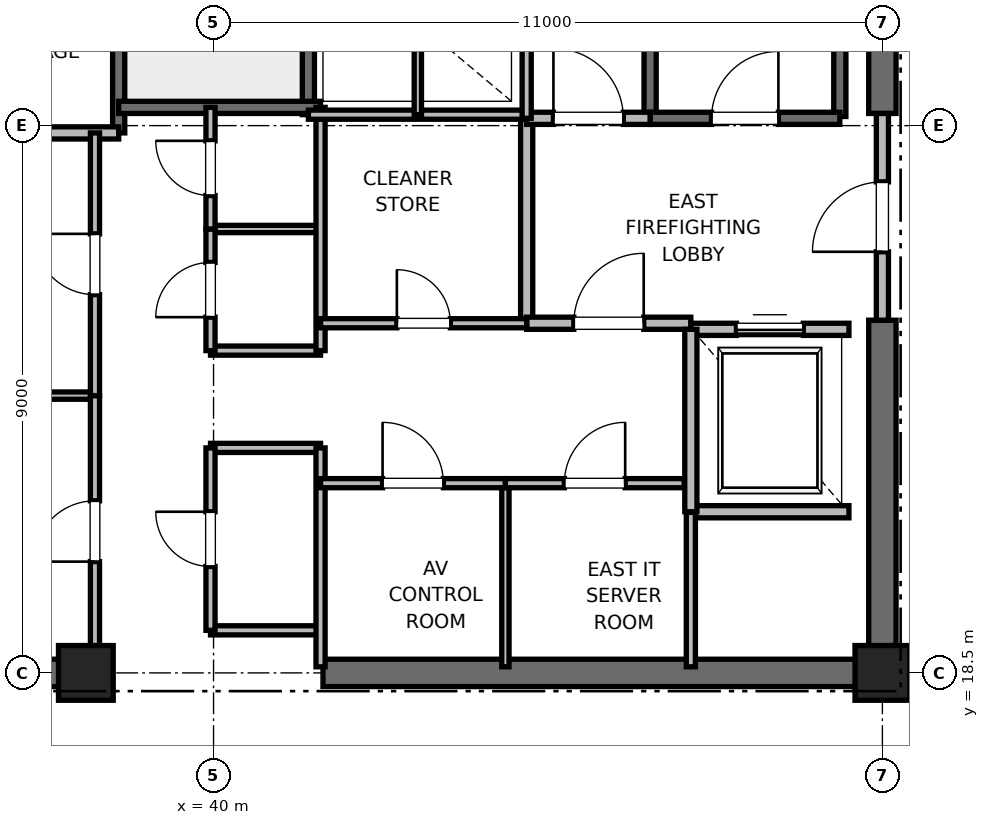
"""IFC4 building model, lengths in metres.
Left out: names, types, materials, properties, quantities, classifications, styles, units other than length and angle.
Written with IfcOpenShell. Run it as: python <this file> out.ifc"""

import sys

from ifc_helpers import new_model, si_unit, direction, frame, frame_2d, origin, origin_2d, place, context, subcontext, project, spatial, rectangle, extrude, element, fill, save


model = new_model("IFC4")
c1 = context("Model", 3, precision=1e-05, world=origin(), true_north=direction((0.0, 1.0)))
c2 = subcontext(c1, "Body", "Model", "MODEL_VIEW")
j1 = project(units=[si_unit("LENGTHUNIT", "METRE"), si_unit("PLANEANGLEUNIT", "RADIAN")], contexts=[c1])
p1 = place(None, origin())
s1 = spatial("IfcSite", under=j1, at=p1, CompositionType="ELEMENT")
p2 = place(p1, origin())
s2 = spatial("IfcBuilding", under=s1, at=p2, CompositionType="ELEMENT")
p3 = place(p2, frame((0.0, 0.0, 291.2)))
s3 = spatial("IfcBuildingStorey", under=s2, at=p3, CompositionType="ELEMENT", Elevation=291.2)
for number, where, z_axis, x_axis in (
    (1, (51.0, 18.5, 0.0), (0.0, 0.0, 1.0), (1.0, 0.0, 0.0)),
    (2, (37.9, 18.5, 0.0), (0.0, 0.0, 1.0), (1.0, 0.0, 0.0)),
):
    element("IfcColumn", number, at=place(p3, frame(where, z_axis=z_axis, x_axis=x_axis)), inside=s3, PredefinedType="PILASTER", context=c2, shape_type="SweptSolid", body=[
        extrude(rectangle(XDim=0.9, YDim=0.9, at=origin_2d()), origin(), (0.0, 0.0, 1.0), 4.0),
    ])
for number, where, z_axis, x_axis in (
    (3, (29.0, 18.5, 0.0), (0.0, 0.0, 1.0), (1.0, 0.0, 0.0)),
    (4, (41.8, 18.5, 0.0), (0.0, 0.0, 1.0), (1.0, 0.0, 0.0)),
):
    element("IfcWall", number, at=place(p3, frame(where, z_axis=z_axis, x_axis=x_axis)), inside=s3, PredefinedType="SHEAR", context=c2, shape_type="SweptSolid", body=[
        extrude(rectangle(XDim=9.2, YDim=0.45, at=frame_2d((4.6, 0.0))), origin(), (0.0, 0.0, 1.0), 3.7),
    ])
p4 = place(p3, frame((51.0, 18.5, 0.0), z_axis=(0.0, 0.0, 1.0), x_axis=(0.0, 1.0, 0.0)))
e5 = element("IfcWall", 5, at=p4, inside=s3, PredefinedType="SHEAR", context=c2, shape_type="SweptSolid", body=[
    extrude(rectangle(XDim=5.8, YDim=0.45, at=frame_2d((2.9, 0.0))), origin(), (0.0, 0.0, 1.0), 3.7),
])
p5 = place(p3, frame((51.0, 27.7, 0.0), z_axis=(0.0, 0.0, 1.0), x_axis=(0.0, 1.0, 0.0)))
e6 = element("IfcWall", 6, at=p5, inside=s3, PredefinedType="SHEAR", context=c2, shape_type="SweptSolid", body=[
    extrude(rectangle(XDim=8.8, YDim=0.45, at=frame_2d((4.4, 0.0))), origin(), (0.0, 0.0, 1.0), 3.7),
])
p6 = place(p3, frame((50.3, 27.65, 0.0), z_axis=(0.0, 0.0, 1.0), x_axis=(0.0, 1.0, 0.0)))
e7 = element("IfcWall", 7, at=p6, inside=s3, PredefinedType="SOLIDWALL", context=c2, shape_type="SweptSolid", body=[
    extrude(rectangle(XDim=8.15, YDim=0.2, at=frame_2d((4.075, 0.0))), origin(), (0.0, 0.0, 1.0), 3.7),
])
p7 = place(p3, frame((47.18, 27.62, 0.0), z_axis=(0.0, 0.0, 1.0), x_axis=(0.0, 1.0, 0.0)))
e8 = element("IfcWall", 8, at=p7, inside=s3, PredefinedType="SOLIDWALL", context=c2, shape_type="SweptSolid", body=[
    extrude(rectangle(XDim=8.18, YDim=0.2, at=frame_2d((4.09, 0.0))), origin(), (0.0, 0.0, 1.0), 3.7),
])
p8 = place(p3, frame((47.18, 27.62, 0.0), z_axis=(0.0, 0.0, 1.0), x_axis=(1.0, 0.0, 0.0)))
e9 = element("IfcWall", 9, at=p8, inside=s3, PredefinedType="SOLIDWALL", context=c2, shape_type="SweptSolid", body=[
    extrude(rectangle(XDim=3.12, YDim=0.2, at=frame_2d((1.56, 0.0))), origin(), (0.0, 0.0, 1.0), 3.7),
])
p9 = place(p8, frame((1.01, 0.0, 0.0)))
e10 = element("IfcOpeningElement", 10, at=p9, cuts=e9, PredefinedType="OPENING", context=c2, shape_type="SweptSolid", body=[
    extrude(rectangle(XDim=1.1, YDim=2.15, at=frame_2d((0.55, 1.075))), frame((0.0, 0.1, 0.0), z_axis=(0.0, -1.0, 0.0), x_axis=(1.0, 0.0, 0.0)), (0.0, 0.0, 1.0), 0.2),
])
p10 = place(p3, frame((38.44, 27.38, 0.0), z_axis=(0.0, 0.0, 1.0), x_axis=(0.0, 1.0, 0.0)))
e11 = element("IfcWall", 11, at=p10, inside=s3, PredefinedType="SOLIDWALL", context=c2, shape_type="SweptSolid", body=[
    extrude(rectangle(XDim=8.87, YDim=0.2, at=frame_2d((4.435, 0.0))), origin(), (0.0, 0.0, 1.0), 3.7),
])
p11 = place(p3, frame((41.56, 27.68, 0.0), z_axis=(0.0, 0.0, 1.0), x_axis=(0.0, 1.0, 0.0)))
e12 = element("IfcWall", 12, at=p11, inside=s3, PredefinedType="SOLIDWALL", context=c2, shape_type="SweptSolid", body=[
    extrude(rectangle(XDim=8.57, YDim=0.2, at=frame_2d((4.285, 0.0))), origin(), (0.0, 0.0, 1.0), 3.7),
])
p12 = place(p3, frame((38.44, 27.8, 0.0), z_axis=(0.0, 0.0, 1.0), x_axis=(1.0, 0.0, 0.0)))
e13 = element("IfcWall", 13, at=p12, inside=s3, PredefinedType="SOLIDWALL", context=c2, shape_type="SweptSolid", body=[
    extrude(rectangle(XDim=3.32, YDim=0.2, at=frame_2d((1.66, 0.0))), origin(), (0.0, 0.0, 1.0), 3.7),
])
p13 = place(p3, frame((32.82, 27.38, 0.0), z_axis=(0.0, 0.0, 1.0), x_axis=(1.0, 0.0, 0.0)))
e14 = element("IfcWall", 14, at=p13, inside=s3, PredefinedType="PARTITIONING", context=c2, shape_type="SweptSolid", body=[
    extrude(rectangle(XDim=5.62, YDim=0.2, at=frame_2d((2.81, 0.0))), origin(), (0.0, 0.0, 1.0), 3.7),
])
p14 = place(p3, frame((45.15, 24.25, 0.0), z_axis=(0.0, 0.0, 1.0), x_axis=(0.0, 1.0, 0.0)))
e15 = element("IfcWall", 15, at=p14, inside=s3, PredefinedType="PARTITIONING", context=c2, shape_type="SweptSolid", body=[
    extrude(rectangle(XDim=3.37, YDim=0.2, at=frame_2d((1.685, 0.0))), origin(), (0.0, 0.0, 1.0), 3.7),
])
p15 = place(p3, frame((45.15, 24.25, 0.0), z_axis=(0.0, 0.0, 1.0), x_axis=(1.0, 0.0, 0.0)))
e16 = element("IfcWall", 16, at=p15, inside=s3, PredefinedType="PARTITIONING", context=c2, shape_type="SweptSolid", body=[
    extrude(rectangle(XDim=2.7, YDim=0.2, at=frame_2d((1.35, 0.0))), origin(), (0.0, 0.0, 1.0), 3.7),
])
p16 = place(p15, frame((0.775, 0.0, 0.0)))
e17 = element("IfcOpeningElement", 17, at=p16, cuts=e16, PredefinedType="OPENING", context=c2, shape_type="SweptSolid", body=[
    extrude(rectangle(XDim=1.15, YDim=2.2, at=frame_2d((0.575, 1.1))), frame((0.0, 0.1, 0.0), z_axis=(0.0, -1.0, 0.0), x_axis=(1.0, 0.0, 0.0)), (0.0, 0.0, 1.0), 0.2),
])
p17 = place(p3, frame((45.15, 27.62, 0.0), z_axis=(0.0, 0.0, 1.0), x_axis=(1.0, 0.0, 0.0)))
e18 = element("IfcWall", 18, at=p17, inside=s3, PredefinedType="PARTITIONING", context=c2, shape_type="SweptSolid", body=[
    extrude(rectangle(XDim=2.03, YDim=0.2, at=frame_2d((1.015, 0.0))), origin(), (0.0, 0.0, 1.0), 3.7),
])
p18 = place(p17, frame((0.44, 0.0, 0.0)))
e19 = element("IfcOpeningElement", 19, at=p18, cuts=e18, PredefinedType="OPENING", context=c2, shape_type="SweptSolid", body=[
    extrude(rectangle(XDim=1.15, YDim=2.2, at=frame_2d((0.575, 1.1))), frame((0.0, 0.1, 0.0), z_axis=(0.0, -1.0, 0.0), x_axis=(1.0, 0.0, 0.0)), (0.0, 0.0, 1.0), 0.2),
])
p19 = place(p3, frame((51.0, 24.3, 0.0), z_axis=(0.0, 0.0, 1.0), x_axis=(0.0, 1.0, 0.0)))
e20 = element("IfcWall", 20, at=p19, inside=s3, PredefinedType="PARTITIONING", context=c2, shape_type="SweptSolid", body=[
    extrude(rectangle(XDim=3.4, YDim=0.2, at=frame_2d((1.7, 0.0))), origin(), (0.0, 0.0, 1.0), 2.78),
])
p20 = place(p19, frame((1.125, 0.0, 0.0)))
e21 = element("IfcOpeningElement", 21, at=p20, cuts=e20, PredefinedType="OPENING", context=c2, shape_type="SweptSolid", body=[
    extrude(rectangle(XDim=1.15, YDim=2.2, at=frame_2d((0.575, 1.1))), frame((0.0, 0.1, 0.0), z_axis=(0.0, -1.0, 0.0), x_axis=(1.0, 0.0, 0.0)), (0.0, 0.0, 1.0), 0.2),
])
p21 = place(p3, frame((47.85, 21.15, 0.0), z_axis=(0.0, 0.0, 1.0), x_axis=(1.0, 0.0, 0.0)))
e22 = element("IfcWall", 22, at=p21, inside=s3, PredefinedType="SOLIDWALL", context=c2, shape_type="SweptSolid", body=[
    extrude(rectangle(XDim=2.6, YDim=0.2, at=frame_2d((1.3, 0.0))), origin(), (0.0, 0.0, 1.0), 3.7),
])
p22 = place(p3, frame((50.45, 24.15, 0.0), z_axis=(0.0, 0.0, 1.0), x_axis=(-1.0, 0.0, 0.0)))
e23 = element("IfcWall", 23, at=p22, inside=s3, PredefinedType="SOLIDWALL", context=c2, shape_type="SweptSolid", body=[
    extrude(rectangle(XDim=2.6, YDim=0.2, at=frame_2d((1.3, 0.0))), origin(), (0.0, 0.0, 1.0), 2.78),
])
p23 = place(p22, frame((0.75, 0.0, 0.0)))
e24 = element("IfcOpeningElement", 24, at=p23, cuts=e23, PredefinedType="OPENING", context=c2, shape_type="SweptSolid", body=[
    extrude(rectangle(XDim=1.1, YDim=2.2, at=frame_2d((0.55, 1.1))), frame((0.0, 0.1, 0.0), z_axis=(0.0, -1.0, 0.0), x_axis=(1.0, 0.0, 0.0)), (0.0, 0.0, 1.0), 0.2),
])
p24 = place(p3, frame((47.85, 24.15, 0.0), z_axis=(0.0, 0.0, 1.0), x_axis=(0.0, -1.0, 0.0)))
e25 = element("IfcWall", 25, at=p24, inside=s3, PredefinedType="SOLIDWALL", context=c2, shape_type="SweptSolid", body=[
    extrude(rectangle(XDim=3.0, YDim=0.2, at=frame_2d((1.5, 0.0))), origin(), (0.0, 0.0, 1.0), 3.7),
])
for number, where, z_axis, x_axis in (
    (26, (39.95, 19.2, 0.0), (0.0, 0.0, 1.0), (1.0, 0.0, 0.0)),
    (27, (39.95, 22.2, 0.0), (0.0, 0.0, 1.0), (1.0, 0.0, 0.0)),
    (28, (39.95, 23.8, 0.0), (0.0, 0.0, 1.0), (1.0, 0.0, 0.0)),
):
    element("IfcWall", number, at=place(p3, frame(where, z_axis=z_axis, x_axis=x_axis)), inside=s3, PredefinedType="PARTITIONING", context=c2, shape_type="SweptSolid", body=[
        extrude(rectangle(XDim=1.81, YDim=0.15, at=frame_2d((0.905, 0.0))), origin(), (0.0, 0.0, 1.0), 2.85),
    ])
p25 = place(p3, frame((39.95, 25.8, 0.0), z_axis=(0.0, 0.0, 1.0), x_axis=(1.0, 0.0, 0.0)))
e29 = element("IfcWall", 29, at=p25, inside=s3, PredefinedType="PARTITIONING", context=c2, shape_type="SweptSolid", body=[
    extrude(rectangle(XDim=1.81, YDim=0.12, at=frame_2d((0.905, 0.0))), origin(), (0.0, 0.0, 1.0), 2.85),
])
p26 = place(p3, frame((41.76, 18.6, 0.0), z_axis=(0.0, 0.0, 1.0), x_axis=(0.0, 1.0, 0.0)))
e30 = element("IfcWall", 30, at=p26, inside=s3, PredefinedType="PARTITIONING", context=c2, shape_type="SweptSolid", body=[
    extrude(rectangle(XDim=3.6, YDim=0.15, at=frame_2d((1.8, 0.0))), origin(), (0.0, 0.0, 1.0), 2.78),
])
p27 = place(p3, frame((41.76, 23.8, 0.0), z_axis=(0.0, 0.0, 1.0), x_axis=(0.0, 1.0, 0.0)))
e31 = element("IfcWall", 31, at=p27, inside=s3, PredefinedType="PARTITIONING", context=c2, shape_type="SweptSolid", body=[
    extrude(rectangle(XDim=4.0, YDim=0.15, at=frame_2d((2.0, 0.0))), origin(), (0.0, 0.0, 1.0), 2.85),
])
p28 = place(p3, frame((39.95, 19.2, 0.0), z_axis=(0.0, 0.0, 1.0), x_axis=(0.0, 1.0, 0.0)))
e32 = element("IfcWall", 32, at=p28, inside=s3, PredefinedType="PARTITIONING", context=c2, shape_type="SweptSolid", body=[
    extrude(rectangle(XDim=3.0, YDim=0.15, at=frame_2d((1.5, 0.0))), origin(), (0.0, 0.0, 1.0), 2.85),
])
p29 = place(p28, frame((1.05, 0.0, 0.0)))
e33 = element("IfcOpeningElement", 33, at=p29, cuts=e32, PredefinedType="OPENING", context=c2, shape_type="SweptSolid", body=[
    extrude(rectangle(XDim=0.9, YDim=2.1, at=frame_2d((0.45, 1.05))), frame((0.0, 0.075, 0.0), z_axis=(0.0, -1.0, 0.0), x_axis=(1.0, 0.0, 0.0)), (0.0, 0.0, 1.0), 0.15),
])
p30 = place(p3, frame((39.95, 23.8, 0.0), z_axis=(0.0, 0.0, 1.0), x_axis=(0.0, 1.0, 0.0)))
e34 = element("IfcWall", 34, at=p30, inside=s3, PredefinedType="PARTITIONING", context=c2, shape_type="SweptSolid", body=[
    extrude(rectangle(XDim=2.0, YDim=0.15, at=frame_2d((1.0, 0.0))), origin(), (0.0, 0.0, 1.0), 2.85),
])
p31 = place(p30, frame((0.55, 0.0, 0.0)))
e35 = element("IfcOpeningElement", 35, at=p31, cuts=e34, PredefinedType="OPENING", context=c2, shape_type="SweptSolid", body=[
    extrude(rectangle(XDim=0.9, YDim=2.1, at=frame_2d((0.45, 1.05))), frame((0.0, 0.075, 0.0), z_axis=(0.0, -1.0, 0.0), x_axis=(1.0, 0.0, 0.0)), (0.0, 0.0, 1.0), 0.15),
])
p32 = place(p3, frame((39.95, 25.8, 0.0), z_axis=(0.0, 0.0, 1.0), x_axis=(0.0, 1.0, 0.0)))
e36 = element("IfcWall", 36, at=p32, inside=s3, PredefinedType="PARTITIONING", context=c2, shape_type="SweptSolid", body=[
    extrude(rectangle(XDim=2.0, YDim=0.15, at=frame_2d((1.0, 0.0))), origin(), (0.0, 0.0, 1.0), 2.85),
])
p33 = place(p32, frame((0.55, 0.0, 0.0)))
e37 = element("IfcOpeningElement", 37, at=p33, cuts=e36, PredefinedType="OPENING", context=c2, shape_type="SweptSolid", body=[
    extrude(rectangle(XDim=0.9, YDim=2.1, at=frame_2d((0.45, 1.05))), frame((0.0, 0.075, 0.0), z_axis=(0.0, -1.0, 0.0), x_axis=(1.0, 0.0, 0.0)), (0.0, 0.0, 1.0), 0.15),
])
p34 = place(p3, frame((32.82, 23.06, 0.0), z_axis=(0.0, 0.0, 1.0), x_axis=(1.0, 0.0, 0.0)))
e38 = element("IfcWall", 38, at=p34, inside=s3, PredefinedType="PARTITIONING", context=c2, shape_type="SweptSolid", body=[
    extrude(rectangle(XDim=5.23, YDim=0.12, at=frame_2d((2.615, 0.0))), origin(), (0.0, 0.0, 1.0), 2.85),
])
p35 = place(p3, frame((38.05, 18.6, 0.0), z_axis=(0.0, 0.0, 1.0), x_axis=(0.0, 1.0, 0.0)))
e39 = element("IfcWall", 39, at=p35, inside=s3, PredefinedType="PARTITIONING", context=c2, shape_type="SweptSolid", body=[
    extrude(rectangle(XDim=4.46, YDim=0.15, at=frame_2d((2.23, 0.0))), origin(), (0.0, 0.0, 1.0), 2.78),
])
p36 = place(p35, frame((1.73, 0.0, 0.0)))
e40 = element("IfcOpeningElement", 40, at=p36, cuts=e39, PredefinedType="OPENING", context=c2, shape_type="SweptSolid", body=[
    extrude(rectangle(XDim=1.0, YDim=2.15, at=frame_2d((0.5, 1.075))), frame((0.0, 0.075, 0.0), z_axis=(0.0, -1.0, 0.0), x_axis=(1.0, 0.0, 0.0)), (0.0, 0.0, 1.0), 0.15),
])
p37 = place(p3, frame((38.05, 23.06, 0.0), z_axis=(0.0, 0.0, 1.0), x_axis=(0.0, 1.0, 0.0)))
e41 = element("IfcWall", 41, at=p37, inside=s3, PredefinedType="PARTITIONING", context=c2, shape_type="SweptSolid", body=[
    extrude(rectangle(XDim=4.32, YDim=0.15, at=frame_2d((2.16, 0.0))), origin(), (0.0, 0.0, 1.0), 2.85),
])
p38 = place(p37, frame((1.66, 0.0, 0.0)))
e42 = element("IfcOpeningElement", 42, at=p38, cuts=e41, PredefinedType="OPENING", context=c2, shape_type="SweptSolid", body=[
    extrude(rectangle(XDim=1.0, YDim=2.15, at=frame_2d((0.5, 1.075))), frame((0.0, 0.075, 0.0), z_axis=(0.0, -1.0, 0.0), x_axis=(1.0, 0.0, 0.0)), (0.0, 0.0, 1.0), 0.15),
])
p39 = place(p3, frame((41.56, 27.68, 0.0), z_axis=(0.0, 0.0, 1.0), x_axis=(1.0, 0.0, 0.0)))
e43 = element("IfcWall", 43, at=p39, inside=s3, PredefinedType="PARTITIONING", context=c2, shape_type="SweptSolid", body=[
    extrude(rectangle(XDim=3.59, YDim=0.15, at=frame_2d((1.795, 0.0))), origin(), (0.0, 0.0, 1.0), 2.85),
])
p40 = place(p3, frame((47.85, 18.6, 0.0), z_axis=(0.0, 0.0, 1.0), x_axis=(0.0, 1.0, 0.0)))
e44 = element("IfcWall", 44, at=p40, inside=s3, PredefinedType="PARTITIONING", context=c2, shape_type="SweptSolid", body=[
    extrude(rectangle(XDim=2.54, YDim=0.15, at=frame_2d((1.27, 0.0))), origin(), (0.0, 0.0, 1.0), 2.85),
])
p41 = place(p3, frame((44.8, 18.6, 0.0), z_axis=(0.0, 0.0, 1.0), x_axis=(0.0, 1.0, 0.0)))
e45 = element("IfcWall", 45, at=p41, inside=s3, PredefinedType="PARTITIONING", context=c2, shape_type="SweptSolid", body=[
    extrude(rectangle(XDim=3.02, YDim=0.12, at=frame_2d((1.51, 0.0))), origin(), (0.0, 0.0, 1.0), 2.85),
])
p42 = place(p3, frame((41.76, 21.62, 0.0), z_axis=(0.0, 0.0, 1.0), x_axis=(1.0, 0.0, 0.0)))
e46 = element("IfcWall", 46, at=p42, inside=s3, PredefinedType="PARTITIONING", context=c2, shape_type="SweptSolid", body=[
    extrude(rectangle(XDim=3.04, YDim=0.15, at=frame_2d((1.52, 0.0))), origin(), (0.0, 0.0, 1.0), 2.85),
])
p43 = place(p42, frame((1.02, 0.0, 0.0)))
e47 = element("IfcOpeningElement", 47, at=p43, cuts=e46, PredefinedType="OPENING", context=c2, shape_type="SweptSolid", body=[
    extrude(rectangle(XDim=1.0, YDim=2.15, at=frame_2d((0.5, 1.075))), frame((0.0, 0.075, 0.0), z_axis=(0.0, -1.0, 0.0), x_axis=(1.0, 0.0, 0.0)), (0.0, 0.0, 1.0), 0.15),
])
p44 = place(p3, frame((44.8, 21.62, 0.0), z_axis=(0.0, 0.0, 1.0), x_axis=(1.0, 0.0, 0.0)))
e48 = element("IfcWall", 48, at=p44, inside=s3, PredefinedType="PARTITIONING", context=c2, shape_type="SweptSolid", body=[
    extrude(rectangle(XDim=2.94, YDim=0.15, at=frame_2d((1.47, 0.0))), origin(), (0.0, 0.0, 1.0), 2.85),
])
p45 = place(p44, frame((0.97, 0.0, 0.0)))
e49 = element("IfcOpeningElement", 49, at=p45, cuts=e48, PredefinedType="OPENING", context=c2, shape_type="SweptSolid", body=[
    extrude(rectangle(XDim=1.0, YDim=2.15, at=frame_2d((0.5, 1.075))), frame((0.0, 0.075, 0.0), z_axis=(0.0, -1.0, 0.0), x_axis=(1.0, 0.0, 0.0)), (0.0, 0.0, 1.0), 0.15),
])
p46 = place(p3, frame((41.76, 24.25, 0.0), z_axis=(0.0, 0.0, 1.0), x_axis=(1.0, 0.0, 0.0)))
e50 = element("IfcWall", 50, at=p46, inside=s3, PredefinedType="PARTITIONING", context=c2, shape_type="SweptSolid", body=[
    extrude(rectangle(XDim=3.39, YDim=0.15, at=frame_2d((1.695, 0.0))), origin(), (0.0, 0.0, 1.0), 2.85),
])
p47 = place(p46, frame((1.255, 0.0, 0.0)))
e51 = element("IfcOpeningElement", 51, at=p47, cuts=e50, PredefinedType="OPENING", context=c2, shape_type="SweptSolid", body=[
    extrude(rectangle(XDim=0.88, YDim=2.1, at=frame_2d((0.44, 1.05))), frame((0.0, 0.075, 0.0), z_axis=(0.0, -1.0, 0.0), x_axis=(1.0, 0.0, 0.0)), (0.0, 0.0, 1.0), 0.15),
])
p48 = place(p3, frame((45.15, 27.62, 0.0), z_axis=(0.0, 0.0, 1.0), x_axis=(0.0, 1.0, 0.0)))
e52 = element("IfcWall", 52, at=p48, inside=s3, PredefinedType="PARTITIONING", context=c2, shape_type="SweptSolid", body=[
    extrude(rectangle(XDim=3.1, YDim=0.15, at=frame_2d((1.55, 0.0))), origin(), (0.0, 0.0, 1.0), 2.85),
])
p49 = place(p3, frame((43.36, 27.68, 0.0), z_axis=(0.0, 0.0, 1.0), x_axis=(0.0, 1.0, 0.0)))
e53 = element("IfcWall", 53, at=p49, inside=s3, PredefinedType="PARTITIONING", context=c2, shape_type="SweptSolid", body=[
    extrude(rectangle(XDim=3.04, YDim=0.12, at=frame_2d((1.52, 0.0))), origin(), (0.0, 0.0, 1.0), 2.85),
])
p50 = place(p9, origin())
e54 = element("IfcDoor", 54, at=p50, inside=s3, OperationType="SINGLE_SWING_RIGHT", PredefinedType="DOOR", context=c2, shape_type="SweptSolid", body=[
    extrude(rectangle(XDim=1.1, YDim=2.15, at=frame_2d((0.55, 1.075))), frame((0.0, 0.025, 0.0), z_axis=(0.0, -1.0, 0.0), x_axis=(1.0, 0.0, 0.0)), (0.0, 0.0, 1.0), 0.05),
])
fill(e10, e54)
p51 = place(p16, origin())
e55 = element("IfcDoor", 55, at=p51, inside=s3, OperationType="SINGLE_SWING_RIGHT", PredefinedType="DOOR", context=c2, shape_type="SweptSolid", body=[
    extrude(rectangle(XDim=1.15, YDim=2.2, at=frame_2d((0.575, 1.1))), frame((0.0, 0.025, 0.0), z_axis=(0.0, -1.0, 0.0), x_axis=(1.0, 0.0, 0.0)), (0.0, 0.0, 1.0), 0.05),
])
fill(e17, e55)
p52 = place(p18, origin())
e56 = element("IfcDoor", 56, at=p52, inside=s3, OperationType="SINGLE_SWING_LEFT", PredefinedType="DOOR", context=c2, shape_type="SweptSolid", body=[
    extrude(rectangle(XDim=1.15, YDim=2.2, at=frame_2d((0.575, 1.1))), frame((0.0, 0.025, 0.0), z_axis=(0.0, -1.0, 0.0), x_axis=(1.0, 0.0, 0.0)), (0.0, 0.0, 1.0), 0.05),
])
fill(e19, e56)
p53 = place(p20, origin())
e57 = element("IfcDoor", 57, at=p53, inside=s3, OperationType="SINGLE_SWING_LEFT", PredefinedType="DOOR", context=c2, shape_type="SweptSolid", body=[
    extrude(rectangle(XDim=1.15, YDim=2.2, at=frame_2d((0.575, 1.1))), frame((0.0, 0.025, 0.0), z_axis=(0.0, -1.0, 0.0), x_axis=(1.0, 0.0, 0.0)), (0.0, 0.0, 1.0), 0.05),
])
fill(e21, e57)
p54 = place(p23, origin())
e58 = element("IfcDoor", 58, at=p54, inside=s3, OperationType="SLIDING_TO_RIGHT", PredefinedType="DOOR", context=c2, shape_type="SweptSolid", body=[
    extrude(rectangle(XDim=1.1, YDim=2.2, at=frame_2d((0.55, 1.1))), frame((0.0, 0.025, 0.0), z_axis=(0.0, -1.0, 0.0), x_axis=(1.0, 0.0, 0.0)), (0.0, 0.0, 1.0), 0.05),
])
fill(e24, e58)
p55 = place(p29, origin())
e59 = element("IfcDoor", 59, at=p55, inside=s3, OperationType="SINGLE_SWING_RIGHT", PredefinedType="DOOR", context=c2, shape_type="SweptSolid", body=[
    extrude(rectangle(XDim=0.9, YDim=2.1, at=frame_2d((0.45, 1.05))), frame((0.0, 0.025, 0.0), z_axis=(0.0, -1.0, 0.0), x_axis=(1.0, 0.0, 0.0)), (0.0, 0.0, 1.0), 0.05),
])
fill(e33, e59)
p56 = place(p31, origin())
e60 = element("IfcDoor", 60, at=p56, inside=s3, OperationType="SINGLE_SWING_LEFT", PredefinedType="DOOR", context=c2, shape_type="SweptSolid", body=[
    extrude(rectangle(XDim=0.9, YDim=2.1, at=frame_2d((0.45, 1.05))), frame((0.0, 0.025, 0.0), z_axis=(0.0, -1.0, 0.0), x_axis=(1.0, 0.0, 0.0)), (0.0, 0.0, 1.0), 0.05),
])
fill(e35, e60)
p57 = place(p33, origin())
e61 = element("IfcDoor", 61, at=p57, inside=s3, OperationType="SINGLE_SWING_RIGHT", PredefinedType="DOOR", context=c2, shape_type="SweptSolid", body=[
    extrude(rectangle(XDim=0.9, YDim=2.1, at=frame_2d((0.45, 1.05))), frame((0.0, 0.025, 0.0), z_axis=(0.0, -1.0, 0.0), x_axis=(1.0, 0.0, 0.0)), (0.0, 0.0, 1.0), 0.05),
])
fill(e37, e61)
p58 = place(p36, origin())
e62 = element("IfcDoor", 62, at=p58, inside=s3, OperationType="SINGLE_SWING_LEFT", PredefinedType="DOOR", context=c2, shape_type="SweptSolid", body=[
    extrude(rectangle(XDim=1.0, YDim=2.15, at=frame_2d((0.5, 1.075))), frame((0.0, 0.025, 0.0), z_axis=(0.0, -1.0, 0.0), x_axis=(1.0, 0.0, 0.0)), (0.0, 0.0, 1.0), 0.05),
])
fill(e40, e62)
p59 = place(p38, origin())
e63 = element("IfcDoor", 63, at=p59, inside=s3, OperationType="SINGLE_SWING_RIGHT", PredefinedType="DOOR", context=c2, shape_type="SweptSolid", body=[
    extrude(rectangle(XDim=1.0, YDim=2.15, at=frame_2d((0.5, 1.075))), frame((0.0, 0.025, 0.0), z_axis=(0.0, -1.0, 0.0), x_axis=(1.0, 0.0, 0.0)), (0.0, 0.0, 1.0), 0.05),
])
fill(e42, e63)
p60 = place(p43, origin())
e64 = element("IfcDoor", 64, at=p60, inside=s3, OperationType="SINGLE_SWING_LEFT", PredefinedType="DOOR", context=c2, shape_type="SweptSolid", body=[
    extrude(rectangle(XDim=1.0, YDim=2.15, at=frame_2d((0.5, 1.075))), frame((0.0, 0.025, 0.0), z_axis=(0.0, -1.0, 0.0), x_axis=(1.0, 0.0, 0.0)), (0.0, 0.0, 1.0), 0.05),
])
fill(e47, e64)
p61 = place(p45, origin())
e65 = element("IfcDoor", 65, at=p61, inside=s3, OperationType="SINGLE_SWING_RIGHT", PredefinedType="DOOR", context=c2, shape_type="SweptSolid", body=[
    extrude(rectangle(XDim=1.0, YDim=2.15, at=frame_2d((0.5, 1.075))), frame((0.0, 0.025, 0.0), z_axis=(0.0, -1.0, 0.0), x_axis=(1.0, 0.0, 0.0)), (0.0, 0.0, 1.0), 0.05),
])
fill(e49, e65)
p62 = place(p47, origin())
e66 = element("IfcDoor", 66, at=p62, inside=s3, OperationType="SINGLE_SWING_LEFT", PredefinedType="DOOR", context=c2, shape_type="SweptSolid", body=[
    extrude(rectangle(XDim=0.88, YDim=2.1, at=frame_2d((0.44, 1.05))), frame((0.0, 0.025, 0.0), z_axis=(0.0, -1.0, 0.0), x_axis=(1.0, 0.0, 0.0)), (0.0, 0.0, 1.0), 0.05),
])
fill(e51, e66)
save(model, sys.argv[1])
